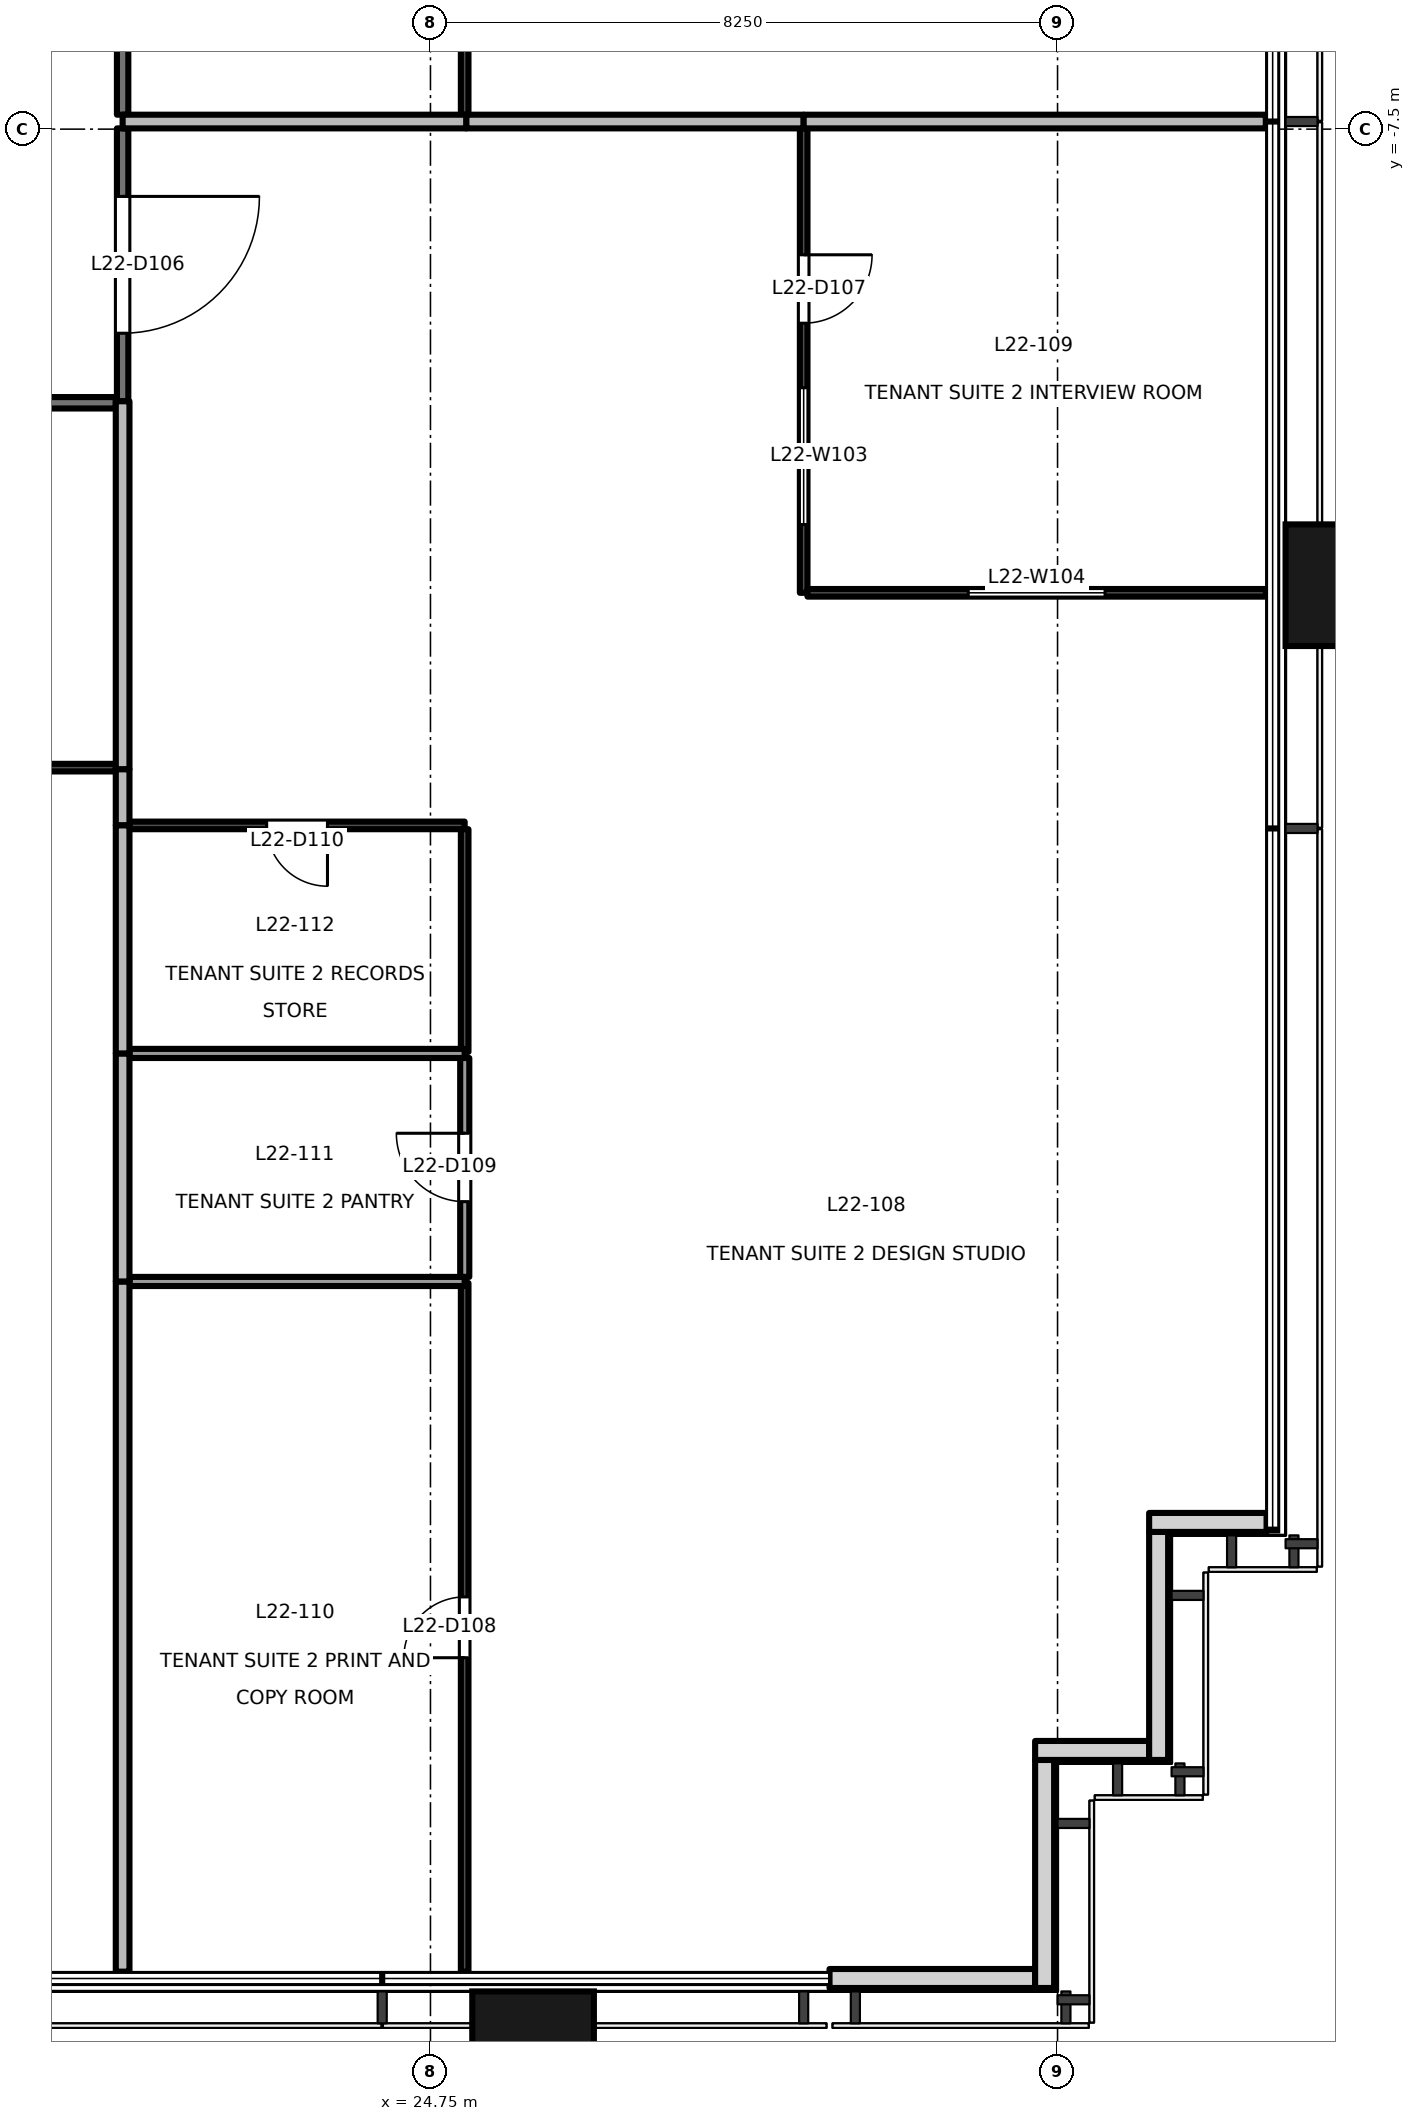
"""IFC4 building model, lengths in metres.
Left out: names, types, materials, properties, quantities, classifications, styles, units other than length and angle.
Written with IfcOpenShell. Run it as: python <this file> out.ifc"""

import sys

from ifc_helpers import new_model, si_unit, direction, frame, frame_2d, origin, origin_2d, place, context, subcontext, project, spatial, rectangle, extrude, element, fill, save


model = new_model("IFC4")
c1 = context("Model", 3, precision=1e-05, world=origin(), true_north=direction((0.0, 1.0)))
c2 = subcontext(c1, "Body", "Model", "MODEL_VIEW")
j1 = project(units=[si_unit("LENGTHUNIT", "METRE"), si_unit("PLANEANGLEUNIT", "RADIAN")], contexts=[c1])
p1 = place(None, origin())
s1 = spatial("IfcSite", under=j1, at=p1, CompositionType="ELEMENT")
p2 = place(p1, origin())
s2 = spatial("IfcBuilding", under=s1, at=p2, CompositionType="ELEMENT")
p3 = place(p2, frame((0.0, 0.0, 99.7)))
s3 = spatial("IfcBuildingStorey", under=s2, at=p3, CompositionType="ELEMENT", Elevation=99.7)
for number, where, z_axis, x_axis in (
    (1, (26.1, -32.9, -0.2), (0.0, 0.0, 1.0), (1.0, 0.0, 0.0)),
    (2, (36.9, -13.5, -0.2), (0.0, 0.0, 1.0), (0.0, 1.0, 0.0)),
):
    element("IfcColumn", number, at=place(p3, frame(where, z_axis=z_axis, x_axis=x_axis)), inside=s3, PredefinedType="COLUMN", context=c2, shape_type="SweptSolid", body=[
        extrude(rectangle(XDim=1.6, YDim=1.8, at=origin_2d()), origin(), (0.0, 0.0, 1.0), 4.0),
    ])
p4 = place(p3, frame((30.0, -31.83, 0.0), z_axis=(0.0, 0.0, 1.0), x_axis=(1.0, 0.0, 0.0)))
e3 = element("IfcWall", 3, at=p4, inside=s3, PredefinedType="SOLIDWALL", context=c2, shape_type="SweptSolid", body=[
    extrude(rectangle(XDim=2.705, YDim=0.25, at=frame_2d((1.353, 0.0))), origin(), (0.0, 0.0, 1.0), 3.8),
])
p5 = place(p3, frame((32.83, -31.955, 0.0), z_axis=(0.0, 0.0, 1.0), x_axis=(0.0, 1.0, 0.0)))
e4 = element("IfcWall", 4, at=p5, inside=s3, PredefinedType="SOLIDWALL", context=c2, shape_type="SweptSolid", body=[
    extrude(rectangle(XDim=3.0, YDim=0.25, at=frame_2d((1.5, 0.0))), origin(), (0.0, 0.0, 1.0), 3.8),
])
p6 = place(p3, frame((32.705, -28.83, 0.0), z_axis=(0.0, 0.0, 1.0), x_axis=(1.0, 0.0, 0.0)))
e5 = element("IfcWall", 5, at=p6, inside=s3, PredefinedType="SOLIDWALL", context=c2, shape_type="SweptSolid", body=[
    extrude(rectangle(XDim=1.5, YDim=0.25, at=frame_2d((0.75, 0.0))), origin(), (0.0, 0.0, 1.0), 3.8),
])
p7 = place(p3, frame((34.33, -28.955, 0.0), z_axis=(0.0, 0.0, 1.0), x_axis=(0.0, 1.0, 0.0)))
e6 = element("IfcWall", 6, at=p7, inside=s3, PredefinedType="SOLIDWALL", context=c2, shape_type="SweptSolid", body=[
    extrude(rectangle(XDim=3.0, YDim=0.25, at=frame_2d((1.5, 0.0))), origin(), (0.0, 0.0, 1.0), 3.8),
])
p8 = place(p3, frame((34.205, -25.83, 0.0), z_axis=(0.0, 0.0, 1.0), x_axis=(1.0, 0.0, 0.0)))
e7 = element("IfcWall", 7, at=p8, inside=s3, PredefinedType="SOLIDWALL", context=c2, shape_type="SweptSolid", body=[
    extrude(rectangle(XDim=1.545, YDim=0.25, at=frame_2d((0.772, 0.0))), origin(), (0.0, 0.0, 1.0), 3.8),
])
p9 = place(p3, frame((20.7, -7.49, 0.0), z_axis=(0.0, 0.0, 1.0), x_axis=(0.0, -1.0, 0.0)))
e8 = element("IfcWall", 8, at=p9, inside=s3, PredefinedType="PARTITIONING", context=c2, shape_type="SweptSolid", body=[
    extrude(rectangle(XDim=3.59, YDim=0.15, at=frame_2d((1.795, 0.0))), origin(), (0.0, 0.0, 1.0), 2.9),
])
p10 = place(p9, frame((0.895, 0.0, 0.0)))
e9 = element("IfcOpeningElement", 9, at=p10, cuts=e8, PredefinedType="OPENING", context=c2, shape_type="SweptSolid", body=[
    extrude(rectangle(XDim=1.8, YDim=2.1, at=frame_2d((0.9, 1.05))), frame((0.0, 0.085, 0.0), z_axis=(0.0, -1.0, 0.0), x_axis=(1.0, 0.0, 0.0)), (0.0, 0.0, 1.0), 0.171),
])
p11 = place(p3, frame((20.7, -3.82, 0.0), z_axis=(0.0, 0.0, 1.0), x_axis=(0.0, -1.0, 0.0)))
e10 = element("IfcWall", 10, at=p11, inside=s3, PredefinedType="PARTITIONING", context=c2, shape_type="SweptSolid", body=[
    extrude(rectangle(XDim=3.49, YDim=0.15, at=frame_2d((1.745, 0.0))), origin(), (0.0, 0.0, 1.0), 2.9),
])
p12 = place(p3, frame((20.61, -11.1, 0.0), z_axis=(0.0, 0.0, 1.0), x_axis=(-1.0, 0.0, 0.0)))
e11 = element("IfcWall", 11, at=p12, inside=s3, PredefinedType="PARTITIONING", context=c2, shape_type="SweptSolid", body=[
    extrude(rectangle(XDim=8.63, YDim=0.15, at=frame_2d((4.315, 0.0))), origin(), (0.0, 0.0, 1.0), 2.4),
])
p13 = place(p3, frame((29.66, -7.49, 0.0), z_axis=(0.0, 0.0, 1.0), x_axis=(0.0, -1.0, 0.0)))
e12 = element("IfcWall", 12, at=p13, inside=s3, PredefinedType="PARTITIONING", context=c2, shape_type="SweptSolid", body=[
    extrude(rectangle(XDim=6.11, YDim=0.1, at=frame_2d((3.055, 0.0))), origin(), (0.0, 0.0, 1.0), 2.9),
])
p14 = place(p13, frame((1.663, 0.0, 0.0)))
e13 = element("IfcOpeningElement", 13, at=p14, cuts=e12, PredefinedType="OPENING", context=c2, shape_type="SweptSolid", body=[
    extrude(rectangle(XDim=0.9, YDim=2.1, at=frame_2d((0.45, 1.05))), frame((0.0, 0.061, 0.0), z_axis=(0.0, -1.0, 0.0), x_axis=(1.0, 0.0, 0.0)), (0.0, 0.0, 1.0), 0.121),
])
p15 = place(p13, frame((3.412, 0.0, 0.9)))
e14 = element("IfcOpeningElement", 14, at=p15, cuts=e12, PredefinedType="OPENING", context=c2, shape_type="SweptSolid", body=[
    extrude(rectangle(XDim=1.8, YDim=1.2, at=frame_2d((0.9, 0.6))), frame((0.0, 0.061, 0.0), z_axis=(0.0, -1.0, 0.0), x_axis=(1.0, 0.0, 0.0)), (0.0, 0.0, 1.0), 0.121),
])
p16 = place(p3, frame((29.71, -13.6, 0.0), z_axis=(0.0, 0.0, 1.0), x_axis=(1.0, 0.0, 0.0)))
e15 = element("IfcWall", 15, at=p16, inside=s3, PredefinedType="PARTITIONING", context=c2, shape_type="SweptSolid", body=[
    extrude(rectangle(XDim=6.03, YDim=0.1, at=frame_2d((3.015, 0.0))), origin(), (0.0, 0.0, 1.0), 2.9),
])
p17 = place(p16, frame((2.115, 0.0, 0.9)))
e16 = element("IfcOpeningElement", 16, at=p17, cuts=e15, PredefinedType="OPENING", context=c2, shape_type="SweptSolid", body=[
    extrude(rectangle(XDim=1.8, YDim=1.2, at=frame_2d((0.9, 0.6))), frame((0.0, 0.061, 0.0), z_axis=(0.0, -1.0, 0.0), x_axis=(1.0, 0.0, 0.0)), (0.0, 0.0, 1.0), 0.121),
])
p18 = place(p3, frame((25.2, -31.74, 0.0), z_axis=(0.0, 0.0, 1.0), x_axis=(0.0, 1.0, 0.0)))
e17 = element("IfcWall", 17, at=p18, inside=s3, PredefinedType="PARTITIONING", context=c2, shape_type="SweptSolid", body=[
    extrude(rectangle(XDim=9.06, YDim=0.1, at=frame_2d((4.53, 0.0))), origin(), (0.0, 0.0, 1.0), 3.8),
])
p19 = place(p18, frame((4.13, 0.0, 0.0)))
e18 = element("IfcOpeningElement", 18, at=p19, cuts=e17, PredefinedType="OPENING", context=c2, shape_type="SweptSolid", body=[
    extrude(rectangle(XDim=0.8, YDim=2.1, at=frame_2d((0.4, 1.05))), frame((0.0, 0.061, 0.0), z_axis=(0.0, -1.0, 0.0), x_axis=(1.0, 0.0, 0.0)), (0.0, 0.0, 1.0), 0.121),
])
p20 = place(p3, frame((25.201, -22.6, 0.0), z_axis=(0.0, 0.0, 1.0), x_axis=(0.0, 1.0, 0.0)))
e19 = element("IfcWall", 19, at=p20, inside=s3, PredefinedType="PARTITIONING", context=c2, shape_type="SweptSolid", body=[
    extrude(rectangle(XDim=2.88, YDim=0.12, at=frame_2d((1.44, 0.0))), origin(), (0.0, 0.0, 1.0), 3.8),
])
p21 = place(p20, frame((0.99, 0.0, 0.0)))
e20 = element("IfcOpeningElement", 20, at=p21, cuts=e19, PredefinedType="OPENING", context=c2, shape_type="SweptSolid", body=[
    extrude(rectangle(XDim=0.9, YDim=2.1, at=frame_2d((0.45, 1.05))), frame((0.0, 0.071, 0.0), z_axis=(0.0, -1.0, 0.0), x_axis=(1.0, 0.0, 0.0)), (0.0, 0.0, 1.0), 0.141),
])
p22 = place(p3, frame((25.2, -16.66, 0.0), z_axis=(0.0, 0.0, 1.0), x_axis=(-1.0, 0.0, 0.0)))
e21 = element("IfcWall", 21, at=p22, inside=s3, PredefinedType="PARTITIONING", context=c2, shape_type="SweptSolid", body=[
    extrude(rectangle(XDim=4.41, YDim=0.1, at=frame_2d((2.205, 0.0))), origin(), (0.0, 0.0, 1.0), 3.8),
])
p23 = place(p22, frame((1.805, 0.0, 0.0)))
e22 = element("IfcOpeningElement", 22, at=p23, cuts=e21, PredefinedType="OPENING", context=c2, shape_type="SweptSolid", body=[
    extrude(rectangle(XDim=0.8, YDim=2.1, at=frame_2d((0.4, 1.05))), frame((0.0, 0.061, 0.0), z_axis=(0.0, -1.0, 0.0), x_axis=(1.0, 0.0, 0.0)), (0.0, 0.0, 1.0), 0.121),
])
p24 = place(p3, frame((25.2, -19.64, 0.0), z_axis=(0.0, 0.0, 1.0), x_axis=(0.0, 1.0, 0.0)))
e23 = element("IfcWall", 23, at=p24, inside=s3, PredefinedType="PARTITIONING", context=c2, shape_type="SweptSolid", body=[
    extrude(rectangle(XDim=2.93, YDim=0.1, at=frame_2d((1.465, 0.0))), origin(), (0.0, 0.0, 1.0), 3.8),
])
p25 = place(p3, frame((25.22, -7.4, 0.0), z_axis=(0.0, 0.0, 1.0), x_axis=(1.0, 0.0, 0.0)))
e24 = element("IfcWall", 24, at=p25, inside=s3, PredefinedType="PARTITIONING", context=c2, shape_type="SweptSolid", body=[
    extrude(rectangle(XDim=4.44, YDim=0.18, at=frame_2d((2.22, 0.0))), origin(), (0.0, 0.0, 1.0), 3.8),
])
p26 = place(p3, frame((20.7, -7.4, 0.0), z_axis=(0.0, 0.0, 1.0), x_axis=(1.0, 0.0, 0.0)))
e25 = element("IfcWall", 25, at=p26, inside=s3, PredefinedType="PARTITIONING", context=c2, shape_type="SweptSolid", body=[
    extrude(rectangle(XDim=4.52, YDim=0.18, at=frame_2d((2.26, 0.0))), origin(), (0.0, 0.0, 1.0), 3.8),
])
p27 = place(p3, frame((20.7, -16.66, 0.0), z_axis=(0.0, 0.0, 1.0), x_axis=(0.0, 1.0, 0.0)))
e26 = element("IfcWall", 26, at=p27, inside=s3, PredefinedType="PARTITIONING", context=c2, shape_type="SweptSolid", body=[
    extrude(rectangle(XDim=0.74, YDim=0.18, at=frame_2d((0.37, 0.0))), origin(), (0.0, 0.0, 1.0), 3.8),
])
p28 = place(p3, frame((20.7, -15.92, 0.0), z_axis=(0.0, 0.0, 1.0), x_axis=(0.0, 1.0, 0.0)))
e27 = element("IfcWall", 27, at=p28, inside=s3, PredefinedType="PARTITIONING", context=c2, shape_type="SweptSolid", body=[
    extrude(rectangle(XDim=4.84, YDim=0.18, at=frame_2d((2.42, 0.0))), origin(), (0.0, 0.0, 1.0), 2.9),
])
p29 = place(p3, frame((29.66, -7.4, 0.0), z_axis=(0.0, 0.0, 1.0), x_axis=(1.0, 0.0, 0.0)))
e28 = element("IfcWall", 28, at=p29, inside=s3, PredefinedType="PARTITIONING", context=c2, shape_type="SweptSolid", body=[
    extrude(rectangle(XDim=6.08, YDim=0.18, at=frame_2d((3.04, 0.0))), origin(), (0.0, 0.0, 1.0), 3.8),
])
p30 = place(p3, frame((20.79, -22.66, 0.0), z_axis=(0.0, 0.0, 1.0), x_axis=(1.0, 0.0, 0.0)))
e29 = element("IfcWall", 29, at=p30, inside=s3, PredefinedType="PARTITIONING", context=c2, shape_type="SweptSolid", body=[
    extrude(rectangle(XDim=4.41, YDim=0.12, at=frame_2d((2.205, 0.0))), origin(), (0.0, 0.0, 1.0), 3.8),
])
p31 = place(p3, frame((20.7, -31.74, 0.0), z_axis=(0.0, 0.0, 1.0), x_axis=(0.0, 1.0, 0.0)))
e30 = element("IfcWall", 30, at=p31, inside=s3, PredefinedType="PARTITIONING", context=c2, shape_type="SweptSolid", body=[
    extrude(rectangle(XDim=9.08, YDim=0.18, at=frame_2d((4.54, 0.0))), origin(), (0.0, 0.0, 1.0), 3.8),
])
p32 = place(p3, frame((20.79, -19.66, 0.0), z_axis=(0.0, 0.0, 1.0), x_axis=(1.0, 0.0, 0.0)))
e31 = element("IfcWall", 31, at=p32, inside=s3, PredefinedType="PARTITIONING", context=c2, shape_type="SweptSolid", body=[
    extrude(rectangle(XDim=4.41, YDim=0.12, at=frame_2d((2.205, 0.0))), origin(), (0.0, 0.0, 1.0), 3.8),
])
for number, where, z_axis, x_axis in (
    (32, (20.7, -22.66, 0.0), (0.0, 0.0, 1.0), (0.0, 1.0, 0.0)),
    (33, (20.7, -19.66, 0.0), (0.0, 0.0, 1.0), (0.0, 1.0, 0.0)),
):
    element("IfcWall", number, at=place(p3, frame(where, z_axis=z_axis, x_axis=x_axis)), inside=s3, PredefinedType="PARTITIONING", context=c2, shape_type="SweptSolid", body=[
        extrude(rectangle(XDim=3.0, YDim=0.18, at=frame_2d((1.5, 0.0))), origin(), (0.0, 0.0, 1.0), 3.8),
    ])
p33 = place(p3, frame((25.2, -7.31, 0.0), z_axis=(0.0, 0.0, 1.0), x_axis=(0.0, 1.0, 0.0)))
e34 = element("IfcWall", 34, at=p33, inside=s3, PredefinedType="PARTITIONING", context=c2, shape_type="SweptSolid", body=[
    extrude(rectangle(XDim=3.49, YDim=0.1, at=frame_2d((1.745, 0.0))), origin(), (0.0, 0.0, 1.0), 2.9),
])
p34 = place(p33, frame((0.877, 0.0, 0.0)))
e35 = element("IfcOpeningElement", 35, at=p34, cuts=e34, PredefinedType="OPENING", context=c2, shape_type="SweptSolid", body=[
    extrude(rectangle(XDim=0.9, YDim=2.1, at=frame_2d((0.45, 1.05))), frame((0.0, 0.061, 0.0), z_axis=(0.0, -1.0, 0.0), x_axis=(1.0, 0.0, 0.0)), (0.0, 0.0, 1.0), 0.121),
])
p35 = place(p3, frame((12.0, -15.9, 0.0), z_axis=(0.0, 0.0, 1.0), x_axis=(1.0, 0.0, 0.0)))
e36 = element("IfcWall", 36, at=p35, inside=s3, PredefinedType="PARTITIONING", context=c2, shape_type="SweptSolid", body=[
    extrude(rectangle(XDim=8.61, YDim=0.1, at=frame_2d((4.305, 0.0))), origin(), (0.0, 0.0, 1.0), 2.4),
])
p36 = place(p35, frame((5.367, 0.0, 0.0)))
e37 = element("IfcOpeningElement", 37, at=p36, cuts=e36, PredefinedType="OPENING", context=c2, shape_type="SweptSolid", body=[
    extrude(rectangle(XDim=0.8, YDim=2.1, at=frame_2d((0.4, 1.05))), frame((0.0, 0.061, 0.0), z_axis=(0.0, -1.0, 0.0), x_axis=(1.0, 0.0, 0.0)), (0.0, 0.0, 1.0), 0.121),
])
p37 = place(p10, origin())
e38 = element("IfcDoor", 38, at=p37, inside=s3, OperationType="DOUBLE_DOOR_SINGLE_SWING", PredefinedType="DOOR", context=c2, shape_type="SweptSolid", body=[
    extrude(rectangle(XDim=1.8, YDim=2.1, at=frame_2d((0.9, 1.05))), frame((0.0, 0.025, 0.0), z_axis=(0.0, -1.0, 0.0), x_axis=(1.0, 0.0, 0.0)), (0.0, 0.0, 1.0), 0.05),
])
fill(e9, e38)
p38 = place(p14, origin())
e39 = element("IfcDoor", 39, at=p38, inside=s3, OperationType="SINGLE_SWING_LEFT", PredefinedType="DOOR", context=c2, shape_type="SweptSolid", body=[
    extrude(rectangle(XDim=0.9, YDim=2.1, at=frame_2d((0.45, 1.05))), frame((0.0, 0.025, 0.0), z_axis=(0.0, -1.0, 0.0), x_axis=(1.0, 0.0, 0.0)), (0.0, 0.0, 1.0), 0.05),
])
fill(e13, e39)
p39 = place(p19, origin())
e40 = element("IfcDoor", 40, at=p39, inside=s3, OperationType="SINGLE_SWING_LEFT", PredefinedType="DOOR", context=c2, shape_type="SweptSolid", body=[
    extrude(rectangle(XDim=0.8, YDim=2.1, at=frame_2d((0.4, 1.05))), frame((0.0, 0.025, 0.0), z_axis=(0.0, -1.0, 0.0), x_axis=(1.0, 0.0, 0.0)), (0.0, 0.0, 1.0), 0.05),
])
fill(e18, e40)
p40 = place(p21, origin())
e41 = element("IfcDoor", 41, at=p40, inside=s3, OperationType="SINGLE_SWING_RIGHT", PredefinedType="DOOR", context=c2, shape_type="SweptSolid", body=[
    extrude(rectangle(XDim=0.9, YDim=2.1, at=frame_2d((0.45, 1.05))), frame((0.0, 0.025, 0.0), z_axis=(0.0, -1.0, 0.0), x_axis=(1.0, 0.0, 0.0)), (0.0, 0.0, 1.0), 0.05),
])
fill(e20, e41)
p41 = place(p23, origin())
e42 = element("IfcDoor", 42, at=p41, inside=s3, OperationType="SINGLE_SWING_LEFT", PredefinedType="DOOR", context=c2, shape_type="SweptSolid", body=[
    extrude(rectangle(XDim=0.8, YDim=2.1, at=frame_2d((0.4, 1.05))), frame((0.0, 0.025, 0.0), z_axis=(0.0, -1.0, 0.0), x_axis=(1.0, 0.0, 0.0)), (0.0, 0.0, 1.0), 0.05),
])
fill(e22, e42)
p42 = place(p15, origin())
e43 = element("IfcWindow", 43, at=p42, inside=s3, PartitioningType="SINGLE_PANEL", PredefinedType="WINDOW", context=c2, shape_type="SweptSolid", body=[
    extrude(rectangle(XDim=1.8, YDim=1.2, at=frame_2d((0.9, 0.6))), frame((0.0, 0.03, 0.0), z_axis=(0.0, -1.0, 0.0), x_axis=(1.0, 0.0, 0.0)), (0.0, 0.0, 1.0), 0.06),
])
fill(e14, e43)
p43 = place(p17, origin())
e44 = element("IfcWindow", 44, at=p43, inside=s3, PartitioningType="SINGLE_PANEL", PredefinedType="WINDOW", context=c2, shape_type="SweptSolid", body=[
    extrude(rectangle(XDim=1.8, YDim=1.2, at=frame_2d((0.9, 0.6))), frame((0.0, 0.03, 0.0), z_axis=(0.0, -1.0, 0.0), x_axis=(1.0, 0.0, 0.0)), (0.0, 0.0, 1.0), 0.06),
])
fill(e16, e44)
save(model, sys.argv[1])
